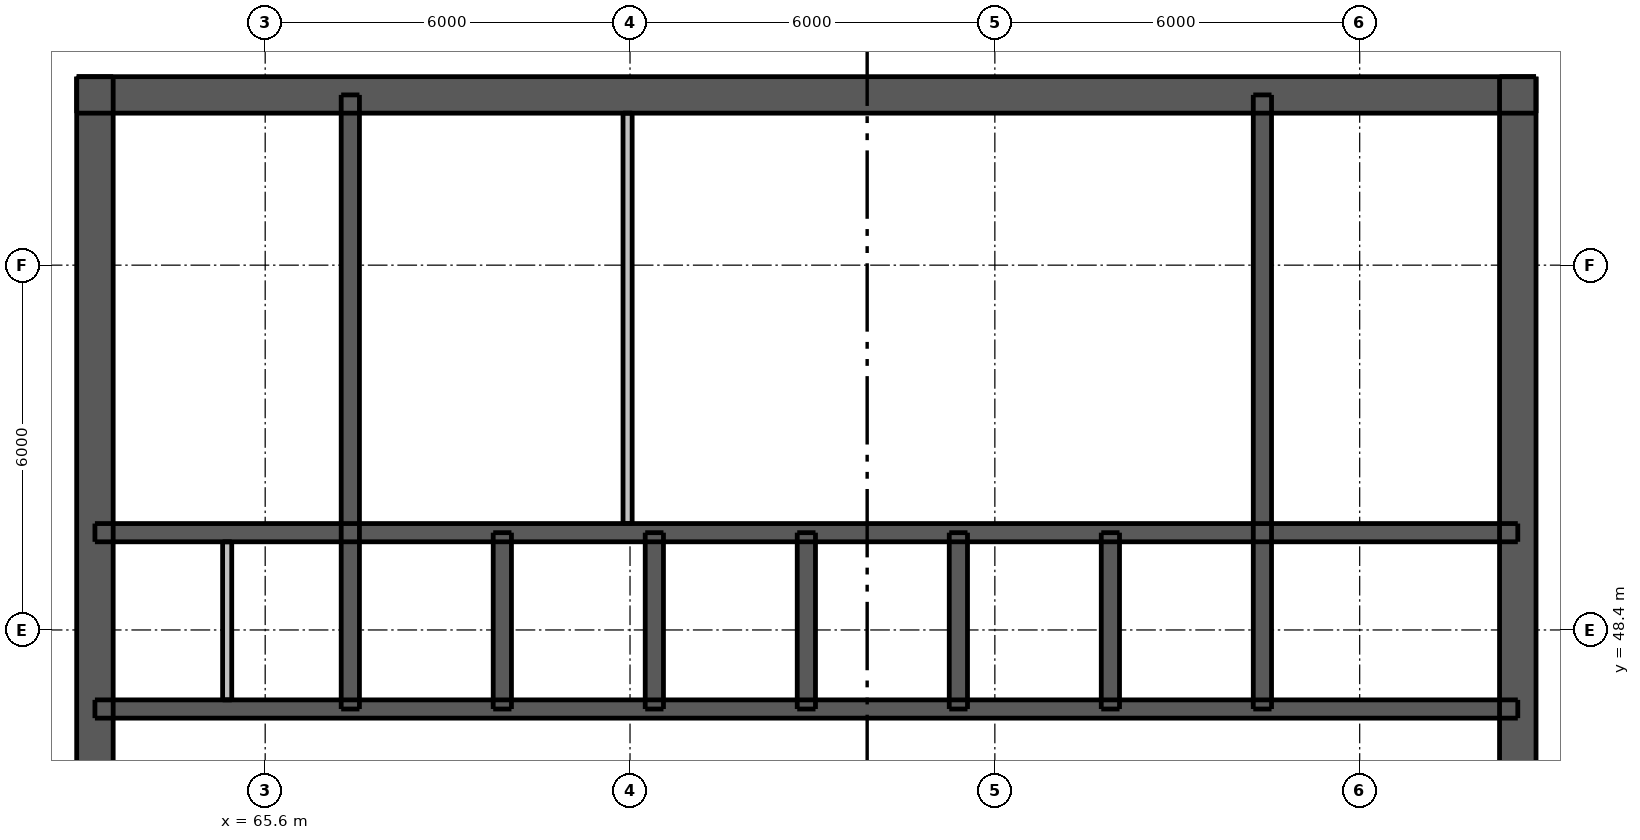
"""IFC4 building model, lengths in metres.
Left out: names, types, materials, properties, quantities, classifications, styles, units other than length and angle.
Written with IfcOpenShell. Run it as: python <this file> out.ifc"""

import sys

from ifc_helpers import new_model, si_unit, direction, frame, frame_2d, origin, place, context, subcontext, project, spatial, rectangle, extrude, element, fill, save


model = new_model("IFC4")
c1 = context("Model", 3, precision=1e-05, world=origin(), true_north=direction((0.0, 1.0)))
c2 = subcontext(c1, "Body", "Model", "MODEL_VIEW")
j1 = project(units=[si_unit("LENGTHUNIT", "METRE"), si_unit("PLANEANGLEUNIT", "RADIAN")], contexts=[c1])
p1 = place(None, origin())
s1 = spatial("IfcSite", under=j1, at=p1, CompositionType="ELEMENT")
p2 = place(p1, origin())
s2 = spatial("IfcBuilding", under=s1, at=p2, CompositionType="ELEMENT")
p3 = place(p2, frame((0.0, 0.0, 196.9)))
s3 = spatial("IfcBuildingStorey", under=s2, at=p3, CompositionType="ELEMENT", Elevation=196.9)
p4 = place(p3, frame((62.5, 57.2, 0.0), z_axis=(0.0, 0.0, 1.0), x_axis=(1.0, 0.0, 0.0)))
e1 = element("IfcWall", 1, at=p4, inside=s3, PredefinedType="SHEAR", context=c2, shape_type="SweptSolid", body=[
    extrude(rectangle(XDim=24.0, YDim=0.6, at=frame_2d((12.0, 0.0))), origin(), (0.0, 0.0, 1.0), 3.05),
])
p5 = place(p4, frame((20.975, 0.0, 0.0)))
e2 = element("IfcOpeningElement", 2, at=p5, cuts=e1, PredefinedType="OPENING", context=c2, shape_type="SweptSolid", body=[
    extrude(rectangle(XDim=1.1, YDim=2.1, at=frame_2d((0.55, 1.05))), frame((0.0, 0.31, 0.0), z_axis=(0.0, -1.0, 0.0), x_axis=(1.0, 0.0, 0.0)), (0.0, 0.0, 1.0), 0.62),
])
p6 = place(p4, frame((1.925, 0.0, 0.0)))
e3 = element("IfcOpeningElement", 3, at=p6, cuts=e1, PredefinedType="OPENING", context=c2, shape_type="SweptSolid", body=[
    extrude(rectangle(XDim=1.1, YDim=2.1, at=frame_2d((0.55, 1.05))), frame((0.0, 0.31, 0.0), z_axis=(0.0, -1.0, 0.0), x_axis=(1.0, 0.0, 0.0)), (0.0, 0.0, 1.0), 0.62),
])
p7 = place(p4, frame((6.405, 0.0, 0.0)))
e4 = element("IfcOpeningElement", 4, at=p7, cuts=e1, PredefinedType="OPENING", context=c2, shape_type="SweptSolid", body=[
    extrude(rectangle(XDim=0.9, YDim=2.1, at=frame_2d((0.45, 1.05))), frame((0.0, 0.31, 0.0), z_axis=(0.0, -1.0, 0.0), x_axis=(1.0, 0.0, 0.0)), (0.0, 0.0, 1.0), 0.62),
])
p8 = place(p4, frame((13.755, 0.0, 0.0)))
e5 = element("IfcOpeningElement", 5, at=p8, cuts=e1, PredefinedType="OPENING", context=c2, shape_type="SweptSolid", body=[
    extrude(rectangle(XDim=0.9, YDim=2.1, at=frame_2d((0.45, 1.05))), frame((0.0, 0.31, 0.0), z_axis=(0.0, -1.0, 0.0), x_axis=(1.0, 0.0, 0.0)), (0.0, 0.0, 1.0), 0.62),
])
p9 = place(p3, frame((62.8, 33.5, 0.0), z_axis=(0.0, 0.0, 1.0), x_axis=(0.0, 1.0, 0.0)))
e6 = element("IfcWall", 6, at=p9, inside=s3, PredefinedType="SHEAR", context=c2, shape_type="SweptSolid", body=[
    extrude(rectangle(XDim=24.0, YDim=0.6, at=frame_2d((12.0, 0.0))), origin(), (0.0, 0.0, 1.0), 3.05),
])
p10 = place(p9, frame((11.2, 0.0, 0.0)))
e7 = element("IfcOpeningElement", 7, at=p10, cuts=e6, PredefinedType="OPENING", context=c2, shape_type="SweptSolid", body=[
    extrude(rectangle(XDim=1.6, YDim=2.1, at=frame_2d((0.8, 1.05))), frame((0.0, 0.31, 0.0), z_axis=(0.0, -1.0, 0.0), x_axis=(1.0, 0.0, 0.0)), (0.0, 0.0, 1.0), 0.62),
])
p11 = place(p3, frame((86.2, 33.5, 0.0), z_axis=(0.0, 0.0, 1.0), x_axis=(0.0, 1.0, 0.0)))
e8 = element("IfcWall", 8, at=p11, inside=s3, PredefinedType="SHEAR", context=c2, shape_type="SweptSolid", body=[
    extrude(rectangle(XDim=24.0, YDim=0.6, at=frame_2d((12.0, 0.0))), origin(), (0.0, 0.0, 1.0), 3.05),
])
p12 = place(p11, frame((11.2, 0.0, 0.0)))
e9 = element("IfcOpeningElement", 9, at=p12, cuts=e8, PredefinedType="OPENING", context=c2, shape_type="SweptSolid", body=[
    extrude(rectangle(XDim=1.6, YDim=2.1, at=frame_2d((0.8, 1.05))), frame((0.0, 0.31, 0.0), z_axis=(0.0, -1.0, 0.0), x_axis=(1.0, 0.0, 0.0)), (0.0, 0.0, 1.0), 0.62),
])
p13 = place(p3, frame((62.8, 47.1, 0.0), z_axis=(0.0, 0.0, 1.0), x_axis=(1.0, 0.0, 0.0)))
e10 = element("IfcWall", 10, at=p13, inside=s3, PredefinedType="SHEAR", context=c2, shape_type="SweptSolid", body=[
    extrude(rectangle(XDim=23.4, YDim=0.3, at=frame_2d((11.7, 0.0))), origin(), (0.0, 0.0, 1.0), 3.05),
])
p14 = place(p13, frame((0.788, 0.0, 0.0)))
e11 = element("IfcOpeningElement", 11, at=p14, cuts=e10, PredefinedType="OPENING", context=c2, shape_type="SweptSolid", body=[
    extrude(rectangle(XDim=0.9, YDim=2.1, at=frame_2d((0.45, 1.05))), frame((0.0, 0.16, 0.0), z_axis=(0.0, -1.0, 0.0), x_axis=(1.0, 0.0, 0.0)), (0.0, 0.0, 1.0), 0.32),
])
p15 = place(p13, frame((2.663, 0.0, 0.0)))
e12 = element("IfcOpeningElement", 12, at=p15, cuts=e10, PredefinedType="OPENING", context=c2, shape_type="SweptSolid", body=[
    extrude(rectangle(XDim=0.9, YDim=2.1, at=frame_2d((0.45, 1.05))), frame((0.0, 0.16, 0.0), z_axis=(0.0, -1.0, 0.0), x_axis=(1.0, 0.0, 0.0)), (0.0, 0.0, 1.0), 0.32),
])
p16 = place(p13, frame((20.775, 0.0, 0.0)))
e13 = element("IfcOpeningElement", 13, at=p16, cuts=e10, PredefinedType="OPENING", context=c2, shape_type="SweptSolid", body=[
    extrude(rectangle(XDim=0.9, YDim=2.1, at=frame_2d((0.45, 1.05))), frame((0.0, 0.16, 0.0), z_axis=(0.0, -1.0, 0.0), x_axis=(1.0, 0.0, 0.0)), (0.0, 0.0, 1.0), 0.32),
])
p17 = place(p13, frame((4.9, 0.0, 0.0)))
e14 = element("IfcOpeningElement", 14, at=p17, cuts=e10, PredefinedType="OPENING", context=c2, shape_type="SweptSolid", body=[
    extrude(rectangle(XDim=1.1, YDim=2.1, at=frame_2d((0.55, 1.05))), frame((0.0, 0.16, 0.0), z_axis=(0.0, -1.0, 0.0), x_axis=(1.0, 0.0, 0.0)), (0.0, 0.0, 1.0), 0.32),
])
p18 = place(p13, frame((7.4, 0.0, 0.0)))
e15 = element("IfcOpeningElement", 15, at=p18, cuts=e10, PredefinedType="OPENING", context=c2, shape_type="SweptSolid", body=[
    extrude(rectangle(XDim=1.1, YDim=2.1, at=frame_2d((0.55, 1.05))), frame((0.0, 0.16, 0.0), z_axis=(0.0, -1.0, 0.0), x_axis=(1.0, 0.0, 0.0)), (0.0, 0.0, 1.0), 0.32),
])
p19 = place(p13, frame((9.9, 0.0, 0.0)))
e16 = element("IfcOpeningElement", 16, at=p19, cuts=e10, PredefinedType="OPENING", context=c2, shape_type="SweptSolid", body=[
    extrude(rectangle(XDim=1.1, YDim=2.1, at=frame_2d((0.55, 1.05))), frame((0.0, 0.16, 0.0), z_axis=(0.0, -1.0, 0.0), x_axis=(1.0, 0.0, 0.0)), (0.0, 0.0, 1.0), 0.32),
])
p20 = place(p13, frame((12.4, 0.0, 0.0)))
e17 = element("IfcOpeningElement", 17, at=p20, cuts=e10, PredefinedType="OPENING", context=c2, shape_type="SweptSolid", body=[
    extrude(rectangle(XDim=1.1, YDim=2.1, at=frame_2d((0.55, 1.05))), frame((0.0, 0.16, 0.0), z_axis=(0.0, -1.0, 0.0), x_axis=(1.0, 0.0, 0.0)), (0.0, 0.0, 1.0), 0.32),
])
p21 = place(p13, frame((14.9, 0.0, 0.0)))
e18 = element("IfcOpeningElement", 18, at=p21, cuts=e10, PredefinedType="OPENING", context=c2, shape_type="SweptSolid", body=[
    extrude(rectangle(XDim=1.1, YDim=2.1, at=frame_2d((0.55, 1.05))), frame((0.0, 0.16, 0.0), z_axis=(0.0, -1.0, 0.0), x_axis=(1.0, 0.0, 0.0)), (0.0, 0.0, 1.0), 0.32),
])
p22 = place(p13, frame((17.4, 0.0, 0.0)))
e19 = element("IfcOpeningElement", 19, at=p22, cuts=e10, PredefinedType="OPENING", context=c2, shape_type="SweptSolid", body=[
    extrude(rectangle(XDim=1.1, YDim=2.1, at=frame_2d((0.55, 1.05))), frame((0.0, 0.16, 0.0), z_axis=(0.0, -1.0, 0.0), x_axis=(1.0, 0.0, 0.0)), (0.0, 0.0, 1.0), 0.32),
])
p23 = place(p3, frame((62.8, 50.0, 0.0), z_axis=(0.0, 0.0, 1.0), x_axis=(1.0, 0.0, 0.0)))
e20 = element("IfcWall", 20, at=p23, inside=s3, PredefinedType="SHEAR", context=c2, shape_type="SweptSolid", body=[
    extrude(rectangle(XDim=23.4, YDim=0.3, at=frame_2d((11.7, 0.0))), origin(), (0.0, 0.0, 1.0), 3.05),
])
for number, where, z_axis, x_axis in (
    (21, (67.0, 47.1, 0.0), (0.0, 0.0, 1.0), (0.0, 1.0, 0.0)),
    (22, (82.0, 47.1, 0.0), (0.0, 0.0, 1.0), (0.0, 1.0, 0.0)),
):
    element("IfcWall", number, at=place(p3, frame(where, z_axis=z_axis, x_axis=x_axis)), inside=s3, PredefinedType="SHEAR", context=c2, shape_type="SweptSolid", body=[
        extrude(rectangle(XDim=10.1, YDim=0.3, at=frame_2d((5.05, 0.0))), origin(), (0.0, 0.0, 1.0), 3.05),
    ])
for number, where, z_axis, x_axis in (
    (23, (69.5, 47.1, 0.0), (0.0, 0.0, 1.0), (0.0, 1.0, 0.0)),
    (24, (72.0, 47.1, 0.0), (0.0, 0.0, 1.0), (0.0, 1.0, 0.0)),
    (25, (74.5, 47.1, 0.0), (0.0, 0.0, 1.0), (0.0, 1.0, 0.0)),
    (26, (77.0, 47.1, 0.0), (0.0, 0.0, 1.0), (0.0, 1.0, 0.0)),
    (27, (79.5, 47.1, 0.0), (0.0, 0.0, 1.0), (0.0, 1.0, 0.0)),
):
    element("IfcWall", number, at=place(p3, frame(where, z_axis=z_axis, x_axis=x_axis)), inside=s3, PredefinedType="SHEAR", context=c2, shape_type="SweptSolid", body=[
        extrude(rectangle(XDim=2.9, YDim=0.3, at=frame_2d((1.45, 0.0))), origin(), (0.0, 0.0, 1.0), 3.05),
    ])
p24 = place(p3, frame((64.975, 47.25, 0.0), z_axis=(0.0, 0.0, 1.0), x_axis=(0.0, 1.0, 0.0)))
e28 = element("IfcWall", 28, at=p24, inside=s3, PredefinedType="PLUMBINGWALL", context=c2, shape_type="SweptSolid", body=[
    extrude(rectangle(XDim=2.6, YDim=0.15, at=frame_2d((1.3, 0.0))), origin(), (0.0, 0.0, 1.0), 3.05),
])
p25 = place(p3, frame((71.56, 50.15, 0.0), z_axis=(0.0, 0.0, 1.0), x_axis=(0.0, 1.0, 0.0)))
e29 = element("IfcWall", 29, at=p25, inside=s3, PredefinedType="PLUMBINGWALL", context=c2, shape_type="SweptSolid", body=[
    extrude(rectangle(XDim=6.75, YDim=0.15, at=frame_2d((3.375, 0.0))), origin(), (0.0, 0.0, 1.0), 3.05),
])
p26 = place(p5, origin())
e30 = element("IfcDoor", 30, at=p26, inside=s3, OperationType="SINGLE_SWING_RIGHT", PredefinedType="DOOR", context=c2, shape_type="SweptSolid", body=[
    extrude(rectangle(XDim=1.1, YDim=2.1, at=frame_2d((0.55, 1.05))), frame((0.0, -0.237, 0.0), z_axis=(0.0, -1.0, 0.0), x_axis=(1.0, 0.0, 0.0)), (0.0, 0.0, 1.0), 0.05),
])
fill(e2, e30)
p27 = place(p6, origin())
e31 = element("IfcDoor", 31, at=p27, inside=s3, OperationType="SINGLE_SWING_LEFT", PredefinedType="DOOR", context=c2, shape_type="SweptSolid", body=[
    extrude(rectangle(XDim=1.1, YDim=2.1, at=frame_2d((0.55, 1.05))), frame((0.0, -0.237, 0.0), z_axis=(0.0, -1.0, 0.0), x_axis=(1.0, 0.0, 0.0)), (0.0, 0.0, 1.0), 0.05),
])
fill(e3, e31)
p28 = place(p10, origin())
e32 = element("IfcDoor", 32, at=p28, inside=s3, OperationType="DOUBLE_DOOR_SINGLE_SWING", PredefinedType="DOOR", context=c2, shape_type="SweptSolid", body=[
    extrude(rectangle(XDim=1.6, YDim=2.1, at=frame_2d((0.8, 1.05))), frame((0.0, -0.237, 0.0), z_axis=(0.0, -1.0, 0.0), x_axis=(1.0, 0.0, 0.0)), (0.0, 0.0, 1.0), 0.05),
])
fill(e7, e32)
p29 = place(p12, origin())
e33 = element("IfcDoor", 33, at=p29, inside=s3, OperationType="DOUBLE_DOOR_SINGLE_SWING", PredefinedType="DOOR", context=c2, shape_type="SweptSolid", body=[
    extrude(rectangle(XDim=1.6, YDim=2.1, at=frame_2d((0.8, 1.05))), frame((0.0, 0.288, 0.0), z_axis=(0.0, -1.0, 0.0), x_axis=(1.0, 0.0, 0.0)), (0.0, 0.0, 1.0), 0.05),
])
fill(e9, e33)
p30 = place(p14, origin())
e34 = element("IfcDoor", 34, at=p30, inside=s3, OperationType="SINGLE_SWING_LEFT", PredefinedType="DOOR", context=c2, shape_type="SweptSolid", body=[
    extrude(rectangle(XDim=0.9, YDim=2.1, at=frame_2d((0.45, 1.05))), frame((0.0, 0.138, 0.0), z_axis=(0.0, -1.0, 0.0), x_axis=(1.0, 0.0, 0.0)), (0.0, 0.0, 1.0), 0.05),
])
fill(e11, e34)
p31 = place(p15, origin())
e35 = element("IfcDoor", 35, at=p31, inside=s3, OperationType="SINGLE_SWING_RIGHT", PredefinedType="DOOR", context=c2, shape_type="SweptSolid", body=[
    extrude(rectangle(XDim=0.9, YDim=2.1, at=frame_2d((0.45, 1.05))), frame((0.0, 0.138, 0.0), z_axis=(0.0, -1.0, 0.0), x_axis=(1.0, 0.0, 0.0)), (0.0, 0.0, 1.0), 0.05),
])
fill(e12, e35)
p32 = place(p16, origin())
e36 = element("IfcDoor", 36, at=p32, inside=s3, OperationType="SINGLE_SWING_LEFT", PredefinedType="DOOR", context=c2, shape_type="SweptSolid", body=[
    extrude(rectangle(XDim=0.9, YDim=2.1, at=frame_2d((0.45, 1.05))), frame((0.0, 0.138, 0.0), z_axis=(0.0, -1.0, 0.0), x_axis=(1.0, 0.0, 0.0)), (0.0, 0.0, 1.0), 0.05),
])
fill(e13, e36)
p33 = place(p7, origin())
e37 = element("IfcDoor", 37, at=p33, inside=s3, OperationType="SINGLE_SWING_RIGHT", PredefinedType="DOOR", context=c2, shape_type="SweptSolid", body=[
    extrude(rectangle(XDim=0.9, YDim=2.1, at=frame_2d((0.45, 1.05))), frame((0.0, -0.237, 0.0), z_axis=(0.0, -1.0, 0.0), x_axis=(1.0, 0.0, 0.0)), (0.0, 0.0, 1.0), 0.05),
])
fill(e4, e37)
p34 = place(p8, origin())
e38 = element("IfcDoor", 38, at=p34, inside=s3, OperationType="SINGLE_SWING_RIGHT", PredefinedType="DOOR", context=c2, shape_type="SweptSolid", body=[
    extrude(rectangle(XDim=0.9, YDim=2.1, at=frame_2d((0.45, 1.05))), frame((0.0, -0.237, 0.0), z_axis=(0.0, -1.0, 0.0), x_axis=(1.0, 0.0, 0.0)), (0.0, 0.0, 1.0), 0.05),
])
fill(e5, e38)
p35 = place(p17, origin())
e39 = element("IfcDoor", 39, at=p35, inside=s3, OperationType="DOUBLE_DOOR_SLIDING", PredefinedType="DOOR", context=c2, shape_type="SweptSolid", body=[
    extrude(rectangle(XDim=1.1, YDim=2.1, at=frame_2d((0.55, 1.05))), frame((0.0, 0.025, 0.0), z_axis=(0.0, -1.0, 0.0), x_axis=(1.0, 0.0, 0.0)), (0.0, 0.0, 1.0), 0.05),
])
fill(e14, e39)
p36 = place(p18, origin())
e40 = element("IfcDoor", 40, at=p36, inside=s3, OperationType="DOUBLE_DOOR_SLIDING", PredefinedType="DOOR", context=c2, shape_type="SweptSolid", body=[
    extrude(rectangle(XDim=1.1, YDim=2.1, at=frame_2d((0.55, 1.05))), frame((0.0, 0.025, 0.0), z_axis=(0.0, -1.0, 0.0), x_axis=(1.0, 0.0, 0.0)), (0.0, 0.0, 1.0), 0.05),
])
fill(e15, e40)
p37 = place(p19, origin())
e41 = element("IfcDoor", 41, at=p37, inside=s3, OperationType="DOUBLE_DOOR_SLIDING", PredefinedType="DOOR", context=c2, shape_type="SweptSolid", body=[
    extrude(rectangle(XDim=1.1, YDim=2.1, at=frame_2d((0.55, 1.05))), frame((0.0, 0.025, 0.0), z_axis=(0.0, -1.0, 0.0), x_axis=(1.0, 0.0, 0.0)), (0.0, 0.0, 1.0), 0.05),
])
fill(e16, e41)
p38 = place(p20, origin())
e42 = element("IfcDoor", 42, at=p38, inside=s3, OperationType="DOUBLE_DOOR_SLIDING", PredefinedType="DOOR", context=c2, shape_type="SweptSolid", body=[
    extrude(rectangle(XDim=1.1, YDim=2.1, at=frame_2d((0.55, 1.05))), frame((0.0, 0.025, 0.0), z_axis=(0.0, -1.0, 0.0), x_axis=(1.0, 0.0, 0.0)), (0.0, 0.0, 1.0), 0.05),
])
fill(e17, e42)
p39 = place(p21, origin())
e43 = element("IfcDoor", 43, at=p39, inside=s3, OperationType="DOUBLE_DOOR_SLIDING", PredefinedType="DOOR", context=c2, shape_type="SweptSolid", body=[
    extrude(rectangle(XDim=1.1, YDim=2.1, at=frame_2d((0.55, 1.05))), frame((0.0, 0.025, 0.0), z_axis=(0.0, -1.0, 0.0), x_axis=(1.0, 0.0, 0.0)), (0.0, 0.0, 1.0), 0.05),
])
fill(e18, e43)
p40 = place(p22, origin())
e44 = element("IfcDoor", 44, at=p40, inside=s3, OperationType="DOUBLE_DOOR_SLIDING", PredefinedType="DOOR", context=c2, shape_type="SweptSolid", body=[
    extrude(rectangle(XDim=1.1, YDim=2.1, at=frame_2d((0.55, 1.05))), frame((0.0, 0.025, 0.0), z_axis=(0.0, -1.0, 0.0), x_axis=(1.0, 0.0, 0.0)), (0.0, 0.0, 1.0), 0.05),
])
fill(e19, e44)
save(model, sys.argv[1])
